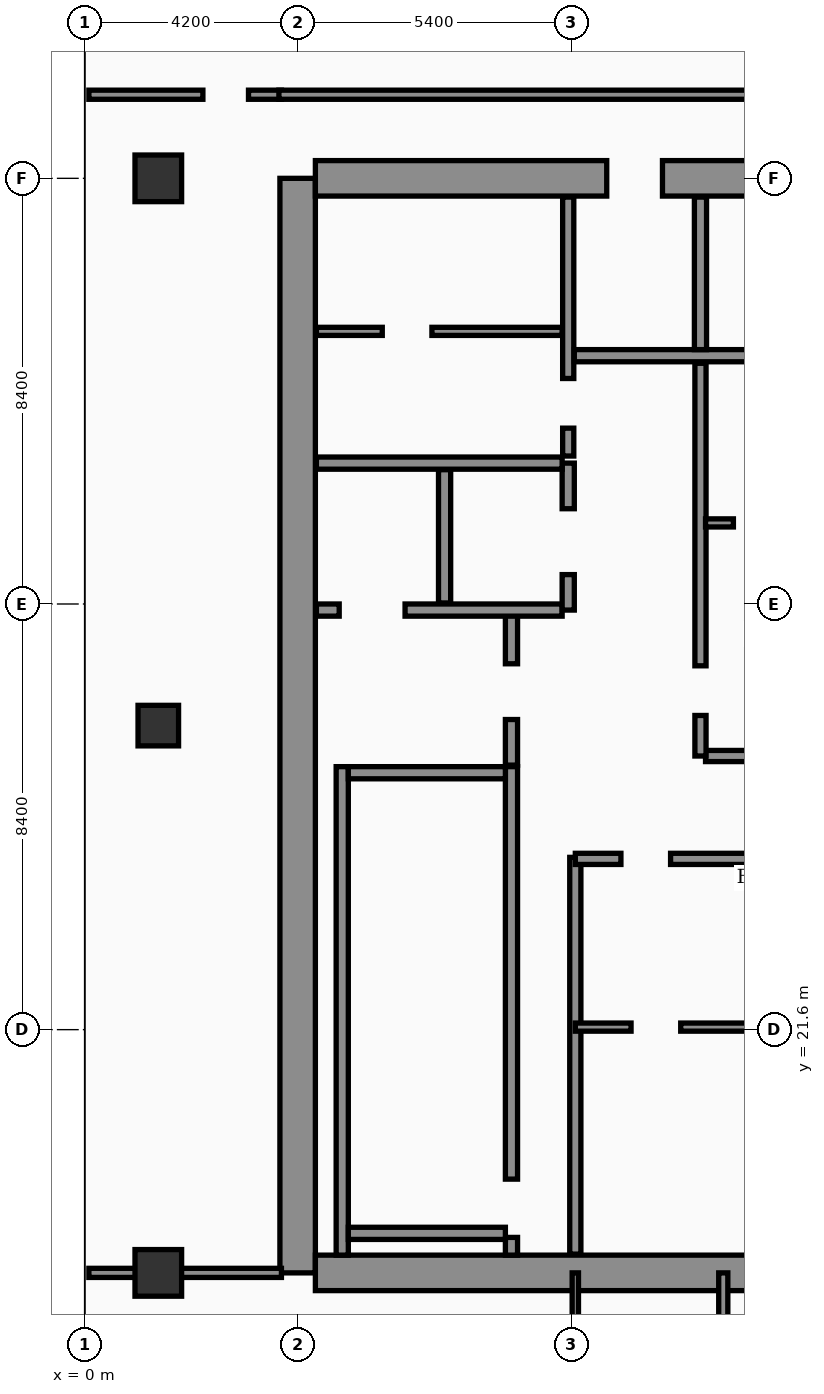
"""IFC4 building model, lengths in metres.
Left out: names, types, materials, properties, quantities, classifications, styles, units other than length and angle.
Written with IfcOpenShell. Run it as: python <this file> out.ifc"""

import sys

from ifc_helpers import new_model, si_unit, direction, frame, frame_2d, origin, origin_2d, place, context, subcontext, project, spatial, rectangle, extrude, element, fill, save


model = new_model("IFC4")
c1 = context("Model", 3, precision=1e-05, world=origin(), true_north=direction((0.0, 1.0)))
c2 = subcontext(c1, "Body", "Model", "MODEL_VIEW")
j1 = project(units=[si_unit("LENGTHUNIT", "METRE"), si_unit("PLANEANGLEUNIT", "RADIAN")], contexts=[c1])
p1 = place(None, origin())
s1 = spatial("IfcSite", under=j1, at=p1, CompositionType="ELEMENT")
p2 = place(p1, origin())
s2 = spatial("IfcBuilding", under=s1, at=p2, CompositionType="ELEMENT")
p3 = place(p2, frame((0.0, 0.0, 251.4)))
s3 = spatial("IfcBuildingStorey", under=s2, at=p3, CompositionType="ELEMENT", Elevation=251.4)
p4 = place(p3, frame((4.2, 16.8, 0.0), z_axis=(0.0, 0.0, 1.0), x_axis=(0.0, 1.0, 0.0)))
e1 = element("IfcWall", 1, at=p4, inside=s3, PredefinedType="SHEAR", context=c2, shape_type="SweptSolid", body=[
    extrude(rectangle(XDim=21.6, YDim=0.7, at=frame_2d((10.8, 0.0))), origin(), (0.0, 0.0, 1.0), 3.56),
])
p5 = place(p3, frame((4.55, 38.4, 0.0), z_axis=(0.0, 0.0, 1.0), x_axis=(1.0, 0.0, 0.0)))
e2 = element("IfcWall", 2, at=p5, inside=s3, PredefinedType="SHEAR", context=c2, shape_type="SweptSolid", body=[
    extrude(rectangle(XDim=10.1, YDim=0.7, at=frame_2d((5.05, 0.0))), origin(), (0.0, 0.0, 1.0), 3.56),
])
p6 = place(p5, frame((5.75, 0.0, 0.0)))
e3 = element("IfcOpeningElement", 3, at=p6, cuts=e2, PredefinedType="OPENING", context=c2, shape_type="SweptSolid", body=[
    extrude(rectangle(XDim=1.1, YDim=2.2, at=frame_2d((0.55, 1.1))), frame((0.0, 0.36, 0.0), z_axis=(0.0, -1.0, 0.0), x_axis=(1.0, 0.0, 0.0)), (0.0, 0.0, 1.0), 0.72),
])
p7 = place(p3, frame((4.55, 16.8, 0.0), z_axis=(0.0, 0.0, 1.0), x_axis=(1.0, 0.0, 0.0)))
e4 = element("IfcWall", 4, at=p7, inside=s3, PredefinedType="SHEAR", context=c2, shape_type="SweptSolid", body=[
    extrude(rectangle(XDim=10.1, YDim=0.7, at=frame_2d((5.05, 0.0))), origin(), (0.0, 0.0, 1.0), 3.56),
])
p8 = place(p3, frame((5.08, 17.15, 0.0), z_axis=(0.0, 0.0, 1.0), x_axis=(0.0, 1.0, 0.0)))
e5 = element("IfcWall", 5, at=p8, inside=s3, PredefinedType="SOLIDWALL", context=c2, shape_type="SweptSolid", body=[
    extrude(rectangle(XDim=9.64, YDim=0.24, at=frame_2d((4.82, 0.0))), origin(), (0.0, 0.0, 1.0), 3.56),
])
p9 = place(p3, frame((8.42, 17.15, 0.0), z_axis=(0.0, 0.0, 1.0), x_axis=(0.0, 1.0, 0.0)))
e6 = element("IfcWall", 6, at=p9, inside=s3, PredefinedType="SOLIDWALL", context=c2, shape_type="SweptSolid", body=[
    extrude(rectangle(XDim=9.64, YDim=0.24, at=frame_2d((4.82, 0.0))), origin(), (0.0, 0.0, 1.0), 3.56),
])
p10 = place(p9, frame((0.35, 0.0, 0.0)))
e7 = element("IfcOpeningElement", 7, at=p10, cuts=e6, PredefinedType="OPENING", context=c2, shape_type="SweptSolid", body=[
    extrude(rectangle(XDim=1.15, YDim=2.2, at=frame_2d((0.575, 1.1))), frame((0.0, 0.13, 0.0), z_axis=(0.0, -1.0, 0.0), x_axis=(1.0, 0.0, 0.0)), (0.0, 0.0, 1.0), 0.26),
])
for number, where, z_axis, x_axis in (
    (8, (5.2, 17.58, 0.0), (0.0, 0.0, 1.0), (1.0, 0.0, 0.0)),
    (9, (5.2, 26.67, 0.0), (0.0, 0.0, 1.0), (1.0, 0.0, 0.0)),
):
    element("IfcWall", number, at=place(p3, frame(where, z_axis=z_axis, x_axis=x_axis)), inside=s3, PredefinedType="SOLIDWALL", context=c2, shape_type="SweptSolid", body=[
        extrude(rectangle(XDim=3.1, YDim=0.24, at=frame_2d((1.55, 0.0))), origin(), (0.0, 0.0, 1.0), 3.56),
    ])
p11 = place(p3, frame((1.45, 16.8, 0.0), z_axis=(0.0, 0.0, 1.0), x_axis=(1.0, 0.0, 0.0)))
e10 = element("IfcColumn", 10, at=p11, inside=s3, PredefinedType="COLUMN", context=c2, shape_type="SweptSolid", body=[
    extrude(rectangle(XDim=0.92, YDim=0.92, at=origin_2d()), origin(), (0.0, 0.0, 1.0), 3.56),
])
p12 = place(p3, frame((1.45, 27.6, 0.0), z_axis=(0.0, 0.0, 1.0), x_axis=(1.0, 0.0, 0.0)))
e11 = element("IfcColumn", 11, at=p12, inside=s3, PredefinedType="COLUMN", context=c2, shape_type="SweptSolid", body=[
    extrude(rectangle(XDim=0.8, YDim=0.8, at=origin_2d()), origin(), (0.0, 0.0, 1.0), 3.56),
])
p13 = place(p3, frame((1.45, 38.4, 0.0), z_axis=(0.0, 0.0, 1.0), x_axis=(1.0, 0.0, 0.0)))
e12 = element("IfcColumn", 12, at=p13, inside=s3, PredefinedType="COLUMN", context=c2, shape_type="SweptSolid", body=[
    extrude(rectangle(XDim=0.92, YDim=0.92, at=origin_2d()), origin(), (0.0, 0.0, 1.0), 3.56),
])
p14 = place(p3, frame((8.42, 26.82, 0.0), z_axis=(0.0, 0.0, 1.0), x_axis=(0.0, 1.0, 0.0)))
e13 = element("IfcWall", 13, at=p14, inside=s3, PredefinedType="SOLIDWALL", context=c2, shape_type="SweptSolid", body=[
    extrude(rectangle(XDim=3.0, YDim=0.24, at=frame_2d((1.5, 0.0))), origin(), (0.0, 0.0, 1.0), 3.56),
])
p15 = place(p14, frame((0.9, 0.0, 0.0)))
e14 = element("IfcOpeningElement", 14, at=p15, cuts=e13, PredefinedType="OPENING", context=c2, shape_type="SweptSolid", body=[
    extrude(rectangle(XDim=1.1, YDim=2.2, at=frame_2d((0.55, 1.1))), frame((0.0, 0.13, 0.0), z_axis=(0.0, -1.0, 0.0), x_axis=(1.0, 0.0, 0.0)), (0.0, 0.0, 1.0), 0.26),
])
p16 = place(p3, frame((4.57, 29.88, 0.0), z_axis=(0.0, 0.0, 1.0), x_axis=(1.0, 0.0, 0.0)))
e15 = element("IfcWall", 15, at=p16, inside=s3, PredefinedType="SOLIDWALL", context=c2, shape_type="SweptSolid", body=[
    extrude(rectangle(XDim=4.85, YDim=0.24, at=frame_2d((2.425, 0.0))), origin(), (0.0, 0.0, 1.0), 3.56),
])
p17 = place(p16, frame((0.45, 0.0, 0.0)))
e16 = element("IfcOpeningElement", 16, at=p17, cuts=e15, PredefinedType="OPENING", context=c2, shape_type="SweptSolid", body=[
    extrude(rectangle(XDim=1.3, YDim=2.35, at=frame_2d((0.65, 1.175))), frame((0.0, 0.13, 0.0), z_axis=(0.0, -1.0, 0.0), x_axis=(1.0, 0.0, 0.0)), (0.0, 0.0, 1.0), 0.26),
])
p18 = place(p3, frame((7.1, 30.02, 0.0), z_axis=(0.0, 0.0, 1.0), x_axis=(0.0, 1.0, 0.0)))
e17 = element("IfcWall", 17, at=p18, inside=s3, PredefinedType="SOLIDWALL", context=c2, shape_type="SweptSolid", body=[
    extrude(rectangle(XDim=2.63, YDim=0.24, at=frame_2d((1.315, 0.0))), origin(), (0.0, 0.0, 1.0), 3.56),
])
p19 = place(p3, frame((9.54, 29.88, 0.0), z_axis=(0.0, 0.0, 1.0), x_axis=(0.0, 1.0, 0.0)))
e18 = element("IfcWall", 18, at=p19, inside=s3, PredefinedType="SOLIDWALL", context=c2, shape_type="SweptSolid", body=[
    extrude(rectangle(XDim=2.9, YDim=0.24, at=frame_2d((1.45, 0.0))), origin(), (0.0, 0.0, 1.0), 3.56),
])
p20 = place(p19, frame((0.7, 0.0, 0.0)))
e19 = element("IfcOpeningElement", 19, at=p20, cuts=e18, PredefinedType="OPENING", context=c2, shape_type="SweptSolid", body=[
    extrude(rectangle(XDim=1.3, YDim=2.35, at=frame_2d((0.65, 1.175))), frame((0.0, 0.13, 0.0), z_axis=(0.0, -1.0, 0.0), x_axis=(1.0, 0.0, 0.0)), (0.0, 0.0, 1.0), 0.26),
])
p21 = place(p3, frame((4.57, 32.78, 0.0), z_axis=(0.0, 0.0, 1.0), x_axis=(1.0, 0.0, 0.0)))
e20 = element("IfcWall", 20, at=p21, inside=s3, PredefinedType="SOLIDWALL", context=c2, shape_type="SweptSolid", body=[
    extrude(rectangle(XDim=4.85, YDim=0.24, at=frame_2d((2.425, 0.0))), origin(), (0.0, 0.0, 1.0), 3.19),
])
p22 = place(p3, frame((9.68, 17.17, 0.0), z_axis=(0.0, 0.0, 1.0), x_axis=(0.0, 1.0, 0.0)))
e21 = element("IfcWall", 21, at=p22, inside=s3, PredefinedType="SOLIDWALL", context=c2, shape_type="SweptSolid", body=[
    extrude(rectangle(XDim=7.83, YDim=0.22, at=frame_2d((3.915, 0.0))), origin(), (0.0, 0.0, 1.0), 3.56),
])
p23 = place(p3, frame((4.57, 35.38, 0.0), z_axis=(0.0, 0.0, 1.0), x_axis=(1.0, 0.0, 0.0)))
e22 = element("IfcWall", 22, at=p23, inside=s3, PredefinedType="PARTITIONING", context=c2, shape_type="SweptSolid", body=[
    extrude(rectangle(XDim=4.85, YDim=0.16, at=frame_2d((2.425, 0.0))), origin(), (0.0, 0.0, 1.0), 3.56),
])
p24 = place(p23, frame((1.3, 0.0, 0.0)))
e23 = element("IfcOpeningElement", 23, at=p24, cuts=e22, PredefinedType="OPENING", context=c2, shape_type="SweptSolid", body=[
    extrude(rectangle(XDim=0.98, YDim=2.15, at=frame_2d((0.49, 1.075))), frame((0.0, 0.09, 0.0), z_axis=(0.0, -1.0, 0.0), x_axis=(1.0, 0.0, 0.0)), (0.0, 0.0, 1.0), 0.18),
])
p25 = place(p3, frame((9.54, 32.92, 0.0), z_axis=(0.0, 0.0, 1.0), x_axis=(0.0, 1.0, 0.0)))
e24 = element("IfcWall", 24, at=p25, inside=s3, PredefinedType="SOLIDWALL", context=c2, shape_type="SweptSolid", body=[
    extrude(rectangle(XDim=5.11, YDim=0.22, at=frame_2d((2.555, 0.0))), origin(), (0.0, 0.0, 1.0), 3.56),
])
p26 = place(p25, frame((0.55, 0.0, 0.0)))
e25 = element("IfcOpeningElement", 25, at=p26, cuts=e24, PredefinedType="OPENING", context=c2, shape_type="SweptSolid", body=[
    extrude(rectangle(XDim=0.98, YDim=2.15, at=frame_2d((0.49, 1.075))), frame((0.0, 0.12, 0.0), z_axis=(0.0, -1.0, 0.0), x_axis=(1.0, 0.0, 0.0)), (0.0, 0.0, 1.0), 0.24),
])
p27 = place(p3, frame((9.68, 21.65, 0.0), z_axis=(0.0, 0.0, 1.0), x_axis=(1.0, 0.0, 0.0)))
e26 = element("IfcWall", 26, at=p27, inside=s3, PredefinedType="PARTITIONING", context=c2, shape_type="SweptSolid", body=[
    extrude(rectangle(XDim=4.95, YDim=0.16, at=frame_2d((2.475, 0.0))), origin(), (0.0, 0.0, 1.0), 3.09),
])
p28 = place(p27, frame((1.1, 0.0, 0.0)))
e27 = element("IfcOpeningElement", 27, at=p28, cuts=e26, PredefinedType="OPENING", context=c2, shape_type="SweptSolid", body=[
    extrude(rectangle(XDim=0.98, YDim=2.15, at=frame_2d((0.49, 1.075))), frame((0.0, 0.09, 0.0), z_axis=(0.0, -1.0, 0.0), x_axis=(1.0, 0.0, 0.0)), (0.0, 0.0, 1.0), 0.18),
])
p29 = place(p3, frame((9.68, 24.97, 0.0), z_axis=(0.0, 0.0, 1.0), x_axis=(1.0, 0.0, 0.0)))
e28 = element("IfcWall", 28, at=p29, inside=s3, PredefinedType="SOLIDWALL", context=c2, shape_type="SweptSolid", body=[
    extrude(rectangle(XDim=4.95, YDim=0.22, at=frame_2d((2.475, 0.0))), origin(), (0.0, 0.0, 1.0), 2.99),
])
p30 = place(p29, frame((0.9, 0.0, 0.0)))
e29 = element("IfcOpeningElement", 29, at=p30, cuts=e28, PredefinedType="OPENING", context=c2, shape_type="SweptSolid", body=[
    extrude(rectangle(XDim=0.98, YDim=2.15, at=frame_2d((0.49, 1.075))), frame((0.0, 0.12, 0.0), z_axis=(0.0, -1.0, 0.0), x_axis=(1.0, 0.0, 0.0)), (0.0, 0.0, 1.0), 0.24),
])
p31 = place(p3, frame((12.25, 27.0, 0.0), z_axis=(0.0, 0.0, 1.0), x_axis=(1.0, 0.0, 0.0)))
e30 = element("IfcWall", 30, at=p31, inside=s3, PredefinedType="SOLIDWALL", context=c2, shape_type="SweptSolid", body=[
    extrude(rectangle(XDim=2.38, YDim=0.22, at=frame_2d((1.19, 0.0))), origin(), (0.0, 0.0, 1.0), 3.56),
])
p32 = place(p3, frame((12.15, 27.0, 0.0), z_axis=(0.0, 0.0, 1.0), x_axis=(0.0, 1.0, 0.0)))
e31 = element("IfcWall", 31, at=p32, inside=s3, PredefinedType="SOLIDWALL", context=c2, shape_type="SweptSolid", body=[
    extrude(rectangle(XDim=7.75, YDim=0.22, at=frame_2d((3.875, 0.0))), origin(), (0.0, 0.0, 1.0), 3.56),
])
p33 = place(p32, frame((0.8, 0.0, 0.0)))
e32 = element("IfcOpeningElement", 32, at=p33, cuts=e31, PredefinedType="OPENING", context=c2, shape_type="SweptSolid", body=[
    extrude(rectangle(XDim=0.98, YDim=2.15, at=frame_2d((0.49, 1.075))), frame((0.0, 0.12, 0.0), z_axis=(0.0, -1.0, 0.0), x_axis=(1.0, 0.0, 0.0)), (0.0, 0.0, 1.0), 0.24),
])
p34 = place(p3, frame((12.25, 31.6, 0.0), z_axis=(0.0, 0.0, 1.0), x_axis=(1.0, 0.0, 0.0)))
e33 = element("IfcWall", 33, at=p34, inside=s3, PredefinedType="PARTITIONING", context=c2, shape_type="SweptSolid", body=[
    extrude(rectangle(XDim=2.38, YDim=0.16, at=frame_2d((1.19, 0.0))), origin(), (0.0, 0.0, 1.0), 3.14),
])
p35 = place(p34, frame((0.55, 0.0, 0.0)))
e34 = element("IfcOpeningElement", 34, at=p35, cuts=e33, PredefinedType="OPENING", context=c2, shape_type="SweptSolid", body=[
    extrude(rectangle(XDim=0.98, YDim=2.15, at=frame_2d((0.49, 1.075))), frame((0.0, 0.09, 0.0), z_axis=(0.0, -1.0, 0.0), x_axis=(1.0, 0.0, 0.0)), (0.0, 0.0, 1.0), 0.18),
])
p36 = place(p3, frame((9.66, 34.9, 0.0), z_axis=(0.0, 0.0, 1.0), x_axis=(1.0, 0.0, 0.0)))
e35 = element("IfcWall", 35, at=p36, inside=s3, PredefinedType="SOLIDWALL", context=c2, shape_type="SweptSolid", body=[
    extrude(rectangle(XDim=4.97, YDim=0.24, at=frame_2d((2.485, 0.0))), origin(), (0.0, 0.0, 1.0), 3.56),
])
p37 = place(p3, frame((12.15, 35.02, 0.0), z_axis=(0.0, 0.0, 1.0), x_axis=(0.0, 1.0, 0.0)))
e36 = element("IfcWall", 36, at=p37, inside=s3, PredefinedType="SOLIDWALL", context=c2, shape_type="SweptSolid", body=[
    extrude(rectangle(XDim=3.01, YDim=0.24, at=frame_2d((1.505, 0.0))), origin(), (0.0, 0.0, 1.0), 3.56),
])
p38 = place(p3, frame((0.08, 16.8, 0.0), z_axis=(0.0, 0.0, 1.0), x_axis=(1.0, 0.0, 0.0)))
e37 = element("IfcWall", 37, at=p38, inside=s3, PredefinedType="PARTITIONING", context=c2, shape_type="SweptSolid", body=[
    extrude(rectangle(XDim=3.8, YDim=0.18, at=frame_2d((1.9, 0.0))), origin(), (0.0, 0.0, 1.0), 2.99),
])
p39 = place(p3, frame((0.08, 40.05, 0.0), z_axis=(0.0, 0.0, 1.0), x_axis=(1.0, 0.0, 0.0)))
e38 = element("IfcWall", 38, at=p39, inside=s3, PredefinedType="PARTITIONING", context=c2, shape_type="SweptSolid", body=[
    extrude(rectangle(XDim=3.8, YDim=0.18, at=frame_2d((1.9, 0.0))), origin(), (0.0, 0.0, 1.0), 2.99),
])
p40 = place(p39, frame((2.25, 0.0, 0.0)))
e39 = element("IfcOpeningElement", 39, at=p40, cuts=e38, PredefinedType="OPENING", context=c2, shape_type="SweptSolid", body=[
    extrude(rectangle(XDim=0.9, YDim=2.15, at=frame_2d((0.45, 1.075))), frame((0.0, 0.1, 0.0), z_axis=(0.0, -1.0, 0.0), x_axis=(1.0, 0.0, 0.0)), (0.0, 0.0, 1.0), 0.2),
])
p41 = place(p3, frame((9.68, 14.75, 0.0), z_axis=(0.0, 0.0, 1.0), x_axis=(0.0, 1.0, 0.0)))
e40 = element("IfcWall", 40, at=p41, inside=s3, PredefinedType="PARTITIONING", context=c2, shape_type="SweptSolid", body=[
    extrude(rectangle(XDim=2.05, YDim=0.125, at=frame_2d((1.025, 0.0))), origin(), (0.0, 0.0, 1.0), 3.56),
])
p42 = place(p3, frame((12.6, 2.44, 0.0), z_axis=(0.0, 0.0, 1.0), x_axis=(0.0, 1.0, 0.0)))
e41 = element("IfcWall", 41, at=p42, inside=s3, PredefinedType="PARTITIONING", context=c2, shape_type="SweptSolid", body=[
    extrude(rectangle(XDim=14.36, YDim=0.18, at=frame_2d((7.18, 0.0))), origin(), (0.0, 0.0, 1.0), 2.99),
])
p43 = place(p42, frame((3.01, 0.0, 0.0)))
e42 = element("IfcOpeningElement", 42, at=p43, cuts=e41, PredefinedType="OPENING", context=c2, shape_type="SweptSolid", body=[
    extrude(rectangle(XDim=1.02, YDim=2.2, at=frame_2d((0.51, 1.1))), frame((0.0, 0.1, 0.0), z_axis=(0.0, -1.0, 0.0), x_axis=(1.0, 0.0, 0.0)), (0.0, 0.0, 1.0), 0.2),
])
p44 = place(p42, frame((9.52, 0.0, 0.0)))
e43 = element("IfcOpeningElement", 43, at=p44, cuts=e41, PredefinedType="OPENING", context=c2, shape_type="SweptSolid", body=[
    extrude(rectangle(XDim=1.02, YDim=2.2, at=frame_2d((0.51, 1.1))), frame((0.0, 0.1, 0.0), z_axis=(0.0, -1.0, 0.0), x_axis=(1.0, 0.0, 0.0)), (0.0, 0.0, 1.0), 0.2),
])
p45 = place(p3, frame((3.83, 40.05, 0.0), z_axis=(0.0, 0.0, 1.0), x_axis=(1.0, 0.0, 0.0)))
e44 = element("IfcWall", 44, at=p45, inside=s3, PredefinedType="PARTITIONING", context=c2, shape_type="SweptSolid", body=[
    extrude(rectangle(XDim=11.32, YDim=0.18, at=frame_2d((5.66, 0.0))), origin(), (0.0, 0.0, 1.0), 2.99),
])
p46 = place(p15, origin())
e45 = element("IfcDoor", 45, at=p46, inside=s3, OperationType="SINGLE_SWING_RIGHT", PredefinedType="DOOR", context=c2, shape_type="SweptSolid", body=[
    extrude(rectangle(XDim=1.1, YDim=2.2, at=frame_2d((0.55, 1.1))), frame((0.0, 0.025, 0.0), z_axis=(0.0, -1.0, 0.0), x_axis=(1.0, 0.0, 0.0)), (0.0, 0.0, 1.0), 0.05),
])
fill(e14, e45)
p47 = place(p17, origin())
e46 = element("IfcDoor", 46, at=p47, inside=s3, OperationType="DOUBLE_DOOR_SLIDING", PredefinedType="DOOR", context=c2, shape_type="SweptSolid", body=[
    extrude(rectangle(XDim=1.3, YDim=2.35, at=frame_2d((0.65, 1.175))), frame((0.0, 0.025, 0.0), z_axis=(0.0, -1.0, 0.0), x_axis=(1.0, 0.0, 0.0)), (0.0, 0.0, 1.0), 0.05),
])
fill(e16, e46)
p48 = place(p20, origin())
e47 = element("IfcDoor", 47, at=p48, inside=s3, OperationType="DOUBLE_DOOR_SLIDING", PredefinedType="DOOR", context=c2, shape_type="SweptSolid", body=[
    extrude(rectangle(XDim=1.3, YDim=2.35, at=frame_2d((0.65, 1.175))), frame((0.0, 0.025, 0.0), z_axis=(0.0, -1.0, 0.0), x_axis=(1.0, 0.0, 0.0)), (0.0, 0.0, 1.0), 0.05),
])
fill(e19, e47)
p49 = place(p24, origin())
e48 = element("IfcDoor", 48, at=p49, inside=s3, OperationType="SINGLE_SWING_RIGHT", PredefinedType="DOOR", context=c2, shape_type="SweptSolid", body=[
    extrude(rectangle(XDim=0.98, YDim=2.15, at=frame_2d((0.49, 1.075))), frame((0.0, 0.025, 0.0), z_axis=(0.0, -1.0, 0.0), x_axis=(1.0, 0.0, 0.0)), (0.0, 0.0, 1.0), 0.05),
])
fill(e23, e48)
p50 = place(p26, origin())
e49 = element("IfcDoor", 49, at=p50, inside=s3, OperationType="SINGLE_SWING_LEFT", PredefinedType="DOOR", context=c2, shape_type="SweptSolid", body=[
    extrude(rectangle(XDim=0.98, YDim=2.15, at=frame_2d((0.49, 1.075))), frame((0.0, 0.025, 0.0), z_axis=(0.0, -1.0, 0.0), x_axis=(1.0, 0.0, 0.0)), (0.0, 0.0, 1.0), 0.05),
])
fill(e25, e49)
p51 = place(p28, origin())
e50 = element("IfcDoor", 50, at=p51, inside=s3, OperationType="SINGLE_SWING_LEFT", PredefinedType="DOOR", context=c2, shape_type="SweptSolid", body=[
    extrude(rectangle(XDim=0.98, YDim=2.15, at=frame_2d((0.49, 1.075))), frame((0.0, 0.025, 0.0), z_axis=(0.0, -1.0, 0.0), x_axis=(1.0, 0.0, 0.0)), (0.0, 0.0, 1.0), 0.05),
])
fill(e27, e50)
p52 = place(p30, origin())
e51 = element("IfcDoor", 51, at=p52, inside=s3, OperationType="SINGLE_SWING_RIGHT", PredefinedType="DOOR", context=c2, shape_type="SweptSolid", body=[
    extrude(rectangle(XDim=0.98, YDim=2.15, at=frame_2d((0.49, 1.075))), frame((0.0, 0.025, 0.0), z_axis=(0.0, -1.0, 0.0), x_axis=(1.0, 0.0, 0.0)), (0.0, 0.0, 1.0), 0.05),
])
fill(e29, e51)
p53 = place(p33, origin())
e52 = element("IfcDoor", 52, at=p53, inside=s3, OperationType="SINGLE_SWING_RIGHT", PredefinedType="DOOR", context=c2, shape_type="SweptSolid", body=[
    extrude(rectangle(XDim=0.98, YDim=2.15, at=frame_2d((0.49, 1.075))), frame((0.0, 0.025, 0.0), z_axis=(0.0, -1.0, 0.0), x_axis=(1.0, 0.0, 0.0)), (0.0, 0.0, 1.0), 0.05),
])
fill(e32, e52)
p54 = place(p35, origin())
e53 = element("IfcDoor", 53, at=p54, inside=s3, OperationType="SINGLE_SWING_LEFT", PredefinedType="DOOR", context=c2, shape_type="SweptSolid", body=[
    extrude(rectangle(XDim=0.98, YDim=2.15, at=frame_2d((0.49, 1.075))), frame((0.0, 0.025, 0.0), z_axis=(0.0, -1.0, 0.0), x_axis=(1.0, 0.0, 0.0)), (0.0, 0.0, 1.0), 0.05),
])
fill(e34, e53)
p55 = place(p40, origin())
e54 = element("IfcDoor", 54, at=p55, inside=s3, OperationType="SINGLE_SWING_LEFT", PredefinedType="DOOR", context=c2, shape_type="SweptSolid", body=[
    extrude(rectangle(XDim=0.9, YDim=2.15, at=frame_2d((0.45, 1.075))), frame((0.0, 0.025, 0.0), z_axis=(0.0, -1.0, 0.0), x_axis=(1.0, 0.0, 0.0)), (0.0, 0.0, 1.0), 0.05),
])
fill(e39, e54)
p56 = place(p10, origin())
e55 = element("IfcDoor", 55, at=p56, inside=s3, OperationType="SINGLE_SWING_LEFT", PredefinedType="DOOR", context=c2, shape_type="SweptSolid", body=[
    extrude(rectangle(XDim=1.15, YDim=2.2, at=frame_2d((0.575, 1.1))), frame((0.0, 0.025, 0.0), z_axis=(0.0, -1.0, 0.0), x_axis=(1.0, 0.0, 0.0)), (0.0, 0.0, 1.0), 0.05),
])
fill(e7, e55)
p57 = place(p6, origin())
e56 = element("IfcDoor", 56, at=p57, inside=s3, OperationType="DOUBLE_DOOR_SLIDING", PredefinedType="DOOR", context=c2, shape_type="SweptSolid", body=[
    extrude(rectangle(XDim=1.1, YDim=2.2, at=frame_2d((0.55, 1.1))), frame((0.0, 0.025, 0.0), z_axis=(0.0, -1.0, 0.0), x_axis=(1.0, 0.0, 0.0)), (0.0, 0.0, 1.0), 0.05),
])
fill(e3, e56)
save(model, sys.argv[1])
